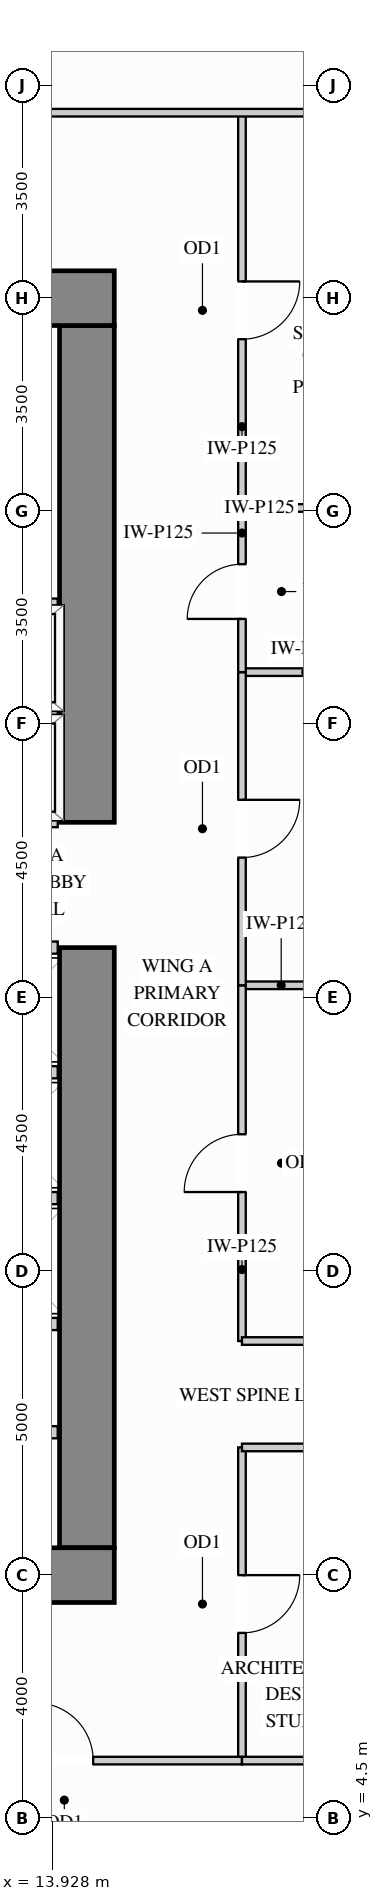
"""IFC4 building model, lengths in metres.
Left out: names, types, materials, properties, quantities, classifications, styles, units other than length and angle.
Written with IfcOpenShell. Run it as: python <this file> out.ifc"""

import sys

from ifc_helpers import new_model, si_unit, direction, frame, frame_2d, origin, place, context, subcontext, project, spatial, rectangle, extrude, source, transform, mapped, element, fill, save


model = new_model("IFC4")
c1 = context("Model", 3, precision=1e-05, world=origin(), true_north=direction((0.0, 1.0)))
c2 = subcontext(c1, "Body", "Model", "MODEL_VIEW")
j1 = project(units=[si_unit("LENGTHUNIT", "METRE"), si_unit("PLANEANGLEUNIT", "RADIAN")], contexts=[c1])
p1 = place(None, origin())
s1 = spatial("IfcSite", under=j1, at=p1, CompositionType="ELEMENT")
p2 = place(p1, origin())
s2 = spatial("IfcBuilding", under=s1, at=p2, CompositionType="ELEMENT")
p3 = place(p2, frame((0.0, 0.0, 47.7)))
s3 = spatial("IfcBuildingStorey", under=s2, at=p3, CompositionType="ELEMENT", Elevation=47.7)
m1 = source(origin(), c2, "Body", "SweptSolid", [
    extrude(rectangle(XDim=9.87, YDim=0.9, at=frame_2d((4.935, 0.0))), origin(), (0.0, 0.0, 1.0), 3.38),
])
p4 = place(p3, frame((14.5, 8.95, 0.0), z_axis=(0.0, 0.0, 1.0), x_axis=(0.0, 1.0, 0.0)))
e1 = element("IfcWall", 1, at=p4, inside=s3, PredefinedType="SHEAR", context=c2, shape_type="MappedRepresentation", body=[
    mapped(m1, transform((0.0, 0.0, 0.0), x_axis=(1.0, 0.0, 0.0), y_axis=(0.0, 1.0, 0.0), z_axis=(0.0, 0.0, 1.0))),
])
m2 = source(origin(), c2, "Body", "SweptSolid", [
    extrude(rectangle(XDim=8.17, YDim=0.9, at=frame_2d((4.085, 0.0))), origin(), (0.0, 0.0, 1.0), 3.38),
])
p5 = place(p3, frame((14.5, 20.88, 0.0), z_axis=(0.0, 0.0, 1.0), x_axis=(0.0, 1.0, 0.0)))
e2 = element("IfcWall", 2, at=p5, inside=s3, PredefinedType="SHEAR", context=c2, shape_type="MappedRepresentation", body=[
    mapped(m2, transform((0.0, 0.0, 0.0), x_axis=(1.0, 0.0, 0.0), y_axis=(0.0, 1.0, 0.0), z_axis=(0.0, 0.0, 1.0))),
])
m3 = source(origin(), c2, "Body", "SweptSolid", [
    extrude(rectangle(XDim=10.9, YDim=0.9, at=frame_2d((5.45, 0.0))), origin(), (0.0, 0.0, 1.0), 3.38),
])
for number, where, z_axis, x_axis in (
    (3, (4.05, 29.5, 0.0), (0.0, 0.0, 1.0), (1.0, 0.0, 0.0)),
    (4, (4.05, 8.5, 0.0), (0.0, 0.0, 1.0), (1.0, 0.0, 0.0)),
):
    element("IfcWall", number, at=place(p3, frame(where, z_axis=z_axis, x_axis=x_axis)), inside=s3, PredefinedType="SHEAR", context=c2, shape_type="MappedRepresentation", body=[
        mapped(m3, transform((0.0, 0.0, 0.0), x_axis=(1.0, 0.0, 0.0), y_axis=(0.0, 1.0, 0.0), z_axis=(0.0, 0.0, 1.0))),
    ])
m4 = source(origin(), c2, "Body", "SweptSolid", [
    extrude(rectangle(XDim=1.29, YDim=0.125, at=frame_2d((0.645, 0.0))), origin(), (0.0, 0.0, 1.0), 2.67),
])
p6 = place(p3, frame((17.05, 18.2, 0.0), z_axis=(0.0, 0.0, 1.0), x_axis=(1.0, 0.0, 0.0)))
e5 = element("IfcWall", 5, at=p6, inside=s3, PredefinedType="PARTITIONING", context=c2, shape_type="MappedRepresentation", body=[
    mapped(m4, transform((0.0, 0.0, 0.0), x_axis=(1.0, 0.0, 0.0), y_axis=(0.0, 1.0, 0.0), z_axis=(0.0, 0.0, 1.0))),
])
m5 = source(origin(), c2, "Body", "SweptSolid", [
    extrude(rectangle(XDim=2.098, YDim=0.125, at=frame_2d((1.049, 0.0))), origin(), (0.0, 0.0, 1.0), 3.365),
])
for number, where, z_axis, x_axis in (
    (6, (17.05, 23.35, 0.0), (0.0, 0.0, 1.0), (1.0, 0.0, 0.0)),
    (7, (17.05, 26.05, 0.0), (0.0, 0.0, 1.0), (1.0, 0.0, 0.0)),
):
    element("IfcWall", number, at=place(p3, frame(where, z_axis=z_axis, x_axis=x_axis)), inside=s3, PredefinedType="PARTITIONING", context=c2, shape_type="MappedRepresentation", body=[
        mapped(m5, transform((0.0, 0.0, 0.0), x_axis=(1.0, 0.0, 0.0), y_axis=(0.0, 1.0, 0.0), z_axis=(0.0, 0.0, 1.0))),
    ])
p7 = place(p3, frame((17.05, 12.35, 0.0), z_axis=(0.0, 0.0, 1.0), x_axis=(0.0, 1.0, 0.0)))
e8 = element("IfcWall", 8, at=p7, inside=s3, PredefinedType="PARTITIONING", context=c2, shape_type="SweptSolid", body=[
    extrude(rectangle(XDim=5.85, YDim=0.125, at=frame_2d((2.925, 0.0))), origin(), (0.0, 0.0, 1.0), 3.365),
])
p8 = place(p7, frame((2.45, 0.0, 0.0)))
e9 = element("IfcOpeningElement", 9, at=p8, cuts=e8, PredefinedType="OPENING", context=c2, shape_type="SweptSolid", body=[
    extrude(rectangle(XDim=0.95, YDim=2.15, at=frame_2d((0.475, 1.075))), frame((0.0, 0.073, 0.0), z_axis=(0.0, -1.0, 0.0), x_axis=(1.0, 0.0, 0.0)), (0.0, 0.0, 1.0), 0.145),
])
p9 = place(p3, frame((17.05, 18.2, 0.0), z_axis=(0.0, 0.0, 1.0), x_axis=(0.0, 1.0, 0.0)))
e10 = element("IfcWall", 10, at=p9, inside=s3, PredefinedType="PARTITIONING", context=c2, shape_type="SweptSolid", body=[
    extrude(rectangle(XDim=5.15, YDim=0.125, at=frame_2d((2.575, 0.0))), origin(), (0.0, 0.0, 1.0), 3.365),
])
p10 = place(p9, frame((2.1, 0.0, 0.0)))
e11 = element("IfcOpeningElement", 11, at=p10, cuts=e10, PredefinedType="OPENING", context=c2, shape_type="SweptSolid", body=[
    extrude(rectangle(XDim=0.95, YDim=2.15, at=frame_2d((0.475, 1.075))), frame((0.0, 0.073, 0.0), z_axis=(0.0, -1.0, 0.0), x_axis=(1.0, 0.0, 0.0)), (0.0, 0.0, 1.0), 0.145),
])
p11 = place(p3, frame((17.05, 26.05, 0.0), z_axis=(0.0, 0.0, 1.0), x_axis=(0.0, 1.0, 0.0)))
e12 = element("IfcWall", 12, at=p11, inside=s3, PredefinedType="PARTITIONING", context=c2, shape_type="SweptSolid", body=[
    extrude(rectangle(XDim=6.5, YDim=0.125, at=frame_2d((3.25, 0.0))), origin(), (0.0, 0.0, 1.0), 3.365),
])
p12 = place(p11, frame((2.775, 0.0, 0.0)))
e13 = element("IfcOpeningElement", 13, at=p12, cuts=e12, PredefinedType="OPENING", context=c2, shape_type="SweptSolid", body=[
    extrude(rectangle(XDim=0.95, YDim=2.15, at=frame_2d((0.475, 1.075))), frame((0.0, 0.073, 0.0), z_axis=(0.0, -1.0, 0.0), x_axis=(1.0, 0.0, 0.0)), (0.0, 0.0, 1.0), 0.145),
])
p13 = place(p3, frame((17.05, 5.45, 0.0), z_axis=(0.0, 0.0, 1.0), x_axis=(0.0, 1.0, 0.0)))
e14 = element("IfcWall", 14, at=p13, inside=s3, PredefinedType="PARTITIONING", context=c2, shape_type="SweptSolid", body=[
    extrude(rectangle(XDim=5.15, YDim=0.125, at=frame_2d((2.575, 0.0))), origin(), (0.0, 0.0, 1.0), 3.365),
])
p14 = place(p13, frame((2.1, 0.0, 0.0)))
e15 = element("IfcOpeningElement", 15, at=p14, cuts=e14, PredefinedType="OPENING", context=c2, shape_type="SweptSolid", body=[
    extrude(rectangle(XDim=0.95, YDim=2.15, at=frame_2d((0.475, 1.075))), frame((0.0, 0.073, 0.0), z_axis=(0.0, -1.0, 0.0), x_axis=(1.0, 0.0, 0.0)), (0.0, 0.0, 1.0), 0.145),
])
p15 = place(p3, frame((17.05, 23.35, 0.0), z_axis=(0.0, 0.0, 1.0), x_axis=(0.0, 1.0, 0.0)))
e16 = element("IfcWall", 16, at=p15, inside=s3, PredefinedType="PARTITIONING", context=c2, shape_type="SweptSolid", body=[
    extrude(rectangle(XDim=2.7, YDim=0.125, at=frame_2d((1.35, 0.0))), origin(), (0.0, 0.0, 1.0), 3.365),
])
p16 = place(p15, frame((0.875, 0.0, 0.0)))
e17 = element("IfcOpeningElement", 17, at=p16, cuts=e16, PredefinedType="OPENING", context=c2, shape_type="SweptSolid", body=[
    extrude(rectangle(XDim=0.9, YDim=2.15, at=frame_2d((0.45, 1.075))), frame((0.0, 0.073, 0.0), z_axis=(0.0, -1.0, 0.0), x_axis=(1.0, 0.0, 0.0)), (0.0, 0.0, 1.0), 0.145),
])
m6 = source(origin(), c2, "Body", "SweptSolid", [
    extrude(rectangle(XDim=5.798, YDim=0.125, at=frame_2d((2.899, 0.0))), origin(), (0.0, 0.0, 1.0), 3.365),
])
p17 = place(p3, frame((13.35, 32.55, 0.0), z_axis=(0.0, 0.0, 1.0), x_axis=(1.0, 0.0, 0.0)))
e18 = element("IfcWall", 18, at=p17, inside=s3, PredefinedType="PARTITIONING", context=c2, shape_type="MappedRepresentation", body=[
    mapped(m6, transform((0.0, 0.0, 0.0), x_axis=(1.0, 0.0, 0.0), y_axis=(0.0, 1.0, 0.0), z_axis=(0.0, 0.0, 1.0))),
])
m7 = source(origin(), c2, "Body", "SweptSolid", [
    extrude(rectangle(XDim=2.45, YDim=0.125, at=frame_2d((1.225, 0.0))), origin(), (0.0, 0.0, 1.0), 3.365),
])
for number, where, z_axis, x_axis in (
    (19, (17.05, 12.35, 0.0), (0.0, 0.0, 1.0), (1.0, 0.0, 0.0)),
    (20, (17.05, 10.6, 0.0), (0.0, 0.0, 1.0), (1.0, 0.0, 0.0)),
):
    element("IfcWall", number, at=place(p3, frame(where, z_axis=z_axis, x_axis=x_axis)), inside=s3, PredefinedType="PARTITIONING", context=c2, shape_type="MappedRepresentation", body=[
        mapped(m7, transform((0.0, 0.0, 0.0), x_axis=(1.0, 0.0, 0.0), y_axis=(0.0, 1.0, 0.0), z_axis=(0.0, 0.0, 1.0))),
    ])
p18 = place(p3, frame((11.206, 5.45, 0.0), z_axis=(0.0, 0.0, 1.0), x_axis=(1.0, 0.0, 0.0)))
e21 = element("IfcWall", 21, at=p18, inside=s3, PredefinedType="PARTITIONING", context=c2, shape_type="SweptSolid", body=[
    extrude(rectangle(XDim=5.844, YDim=0.125, at=frame_2d((2.922, 0.0))), origin(), (0.0, 0.0, 1.0), 3.365),
])
p19 = place(p18, frame((2.447, 0.0, 0.0)))
e22 = element("IfcOpeningElement", 22, at=p19, cuts=e21, PredefinedType="OPENING", context=c2, shape_type="SweptSolid", body=[
    extrude(rectangle(XDim=0.95, YDim=2.15, at=frame_2d((0.475, 1.075))), frame((0.0, 0.073, 0.0), z_axis=(0.0, -1.0, 0.0), x_axis=(1.0, 0.0, 0.0)), (0.0, 0.0, 1.0), 0.145),
])
p20 = place(p3, frame((17.05, 5.45, 0.0), z_axis=(0.0, 0.0, 1.0), x_axis=(1.0, 0.0, 0.0)))
e23 = element("IfcWall", 23, at=p20, inside=s3, PredefinedType="PARTITIONING", context=c2, shape_type="MappedRepresentation", body=[
    mapped(m5, transform((0.0, 0.0, 0.0), x_axis=(1.0, 0.0, 0.0), y_axis=(0.0, 1.0, 0.0), z_axis=(0.0, 0.0, 1.0))),
])
m8 = source(origin(), c2, "Body", "SweptSolid", [
    extrude(rectangle(XDim=1.6, YDim=0.2, at=frame_2d((0.8, 0.0))), origin(), (0.0, 0.0, 1.0), 3.365),
])
p21 = place(p3, frame((12.42, 10.85, 0.0), z_axis=(0.0, 0.0, 1.0), x_axis=(1.0, 0.0, 0.0)))
e24 = element("IfcWall", 24, at=p21, inside=s3, PredefinedType="PARTITIONING", context=c2, shape_type="MappedRepresentation", body=[
    mapped(m8, transform((0.0, 0.0, 0.0), x_axis=(1.0, 0.0, 0.0), y_axis=(0.0, 1.0, 0.0), z_axis=(0.0, 0.0, 1.0))),
])
m9 = source(origin(), c2, "Body", "SweptSolid", [
    extrude(rectangle(XDim=2.19, YDim=0.2, at=frame_2d((1.095, 0.0))), origin(), (0.0, 0.0, 1.0), 3.365),
])
for number, where, z_axis, x_axis in (
    (25, (11.83, 22.66, 0.0), (0.0, 0.0, 1.0), (1.0, 0.0, 0.0)),
    (26, (11.83, 20.9, 0.0), (0.0, 0.0, 1.0), (1.0, 0.0, 0.0)),
    (27, (11.83, 24.46, 0.0), (0.0, 0.0, 1.0), (1.0, 0.0, 0.0)),
):
    element("IfcWall", number, at=place(p3, frame(where, z_axis=z_axis, x_axis=x_axis)), inside=s3, PredefinedType="PARTITIONING", context=c2, shape_type="MappedRepresentation", body=[
        mapped(m9, transform((0.0, 0.0, 0.0), x_axis=(1.0, 0.0, 0.0), y_axis=(0.0, 1.0, 0.0), z_axis=(0.0, 0.0, 1.0))),
    ])
m10 = source(origin(), c2, "Body", "SweptSolid", [
    extrude(rectangle(XDim=1.79, YDim=0.2, at=frame_2d((0.895, 0.0))), origin(), (0.0, 0.0, 1.0), 3.365),
])
for number, where, z_axis, x_axis in (
    (28, (12.23, 14.7, 0.0), (0.0, 0.0, 1.0), (1.0, 0.0, 0.0)),
    (29, (12.23, 12.63, 0.0), (0.0, 0.0, 1.0), (1.0, 0.0, 0.0)),
    (30, (12.23, 16.77, 0.0), (0.0, 0.0, 1.0), (1.0, 0.0, 0.0)),
    (31, (12.23, 18.82, 0.0), (0.0, 0.0, 1.0), (1.0, 0.0, 0.0)),
):
    element("IfcWall", number, at=place(p3, frame(where, z_axis=z_axis, x_axis=x_axis)), inside=s3, PredefinedType="PARTITIONING", context=c2, shape_type="MappedRepresentation", body=[
        mapped(m10, transform((0.0, 0.0, 0.0), x_axis=(1.0, 0.0, 0.0), y_axis=(0.0, 1.0, 0.0), z_axis=(0.0, 0.0, 1.0))),
    ])
m11 = source(origin(), c2, "Body", "SweptSolid", [
    extrude(rectangle(XDim=0.95, YDim=2.15, at=frame_2d((0.475, 1.075))), frame((0.0, 0.025, 0.0), z_axis=(0.0, -1.0, 0.0), x_axis=(1.0, 0.0, 0.0)), (0.0, 0.0, 1.0), 0.05),
])
p22 = place(p14, origin())
e32 = element("IfcDoor", 32, at=p22, inside=s3, OperationType="SINGLE_SWING_RIGHT", PredefinedType="DOOR", context=c2, shape_type="MappedRepresentation", body=[
    mapped(m11, transform((0.0, 0.0, 0.0), x_axis=(1.0, 0.0, 0.0), y_axis=(0.0, 1.0, 0.0), z_axis=(0.0, 0.0, 1.0))),
])
fill(e15, e32)
p23 = place(p8, origin())
e33 = element("IfcDoor", 33, at=p23, inside=s3, OperationType="SINGLE_SWING_LEFT", PredefinedType="DOOR", context=c2, shape_type="MappedRepresentation", body=[
    mapped(m11, transform((0.0, 0.0, 0.0), x_axis=(1.0, 0.0, 0.0), y_axis=(0.0, 1.0, 0.0), z_axis=(0.0, 0.0, 1.0))),
])
fill(e9, e33)
p24 = place(p10, origin())
e34 = element("IfcDoor", 34, at=p24, inside=s3, OperationType="SINGLE_SWING_RIGHT", PredefinedType="DOOR", context=c2, shape_type="MappedRepresentation", body=[
    mapped(m11, transform((0.0, 0.0, 0.0), x_axis=(1.0, 0.0, 0.0), y_axis=(0.0, 1.0, 0.0), z_axis=(0.0, 0.0, 1.0))),
])
fill(e11, e34)
p25 = place(p12, origin())
e35 = element("IfcDoor", 35, at=p25, inside=s3, OperationType="SINGLE_SWING_RIGHT", PredefinedType="DOOR", context=c2, shape_type="MappedRepresentation", body=[
    mapped(m11, transform((0.0, 0.0, 0.0), x_axis=(1.0, 0.0, 0.0), y_axis=(0.0, 1.0, 0.0), z_axis=(0.0, 0.0, 1.0))),
])
fill(e13, e35)
p26 = place(p19, origin())
e36 = element("IfcDoor", 36, at=p26, inside=s3, OperationType="SINGLE_SWING_LEFT", PredefinedType="DOOR", context=c2, shape_type="MappedRepresentation", body=[
    mapped(m11, transform((0.0, 0.0, 0.0), x_axis=(1.0, 0.0, 0.0), y_axis=(0.0, 1.0, 0.0), z_axis=(0.0, 0.0, 1.0))),
])
fill(e22, e36)
m12 = source(origin(), c2, "Body", "SweptSolid", [
    extrude(rectangle(XDim=0.9, YDim=2.15, at=frame_2d((0.45, 1.075))), frame((0.0, 0.025, 0.0), z_axis=(0.0, -1.0, 0.0), x_axis=(1.0, 0.0, 0.0)), (0.0, 0.0, 1.0), 0.05),
])
p27 = place(p16, origin())
e37 = element("IfcDoor", 37, at=p27, inside=s3, OperationType="SINGLE_SWING_LEFT", PredefinedType="DOOR", context=c2, shape_type="MappedRepresentation", body=[
    mapped(m12, transform((0.0, 0.0, 0.0), x_axis=(1.0, 0.0, 0.0), y_axis=(0.0, 1.0, 0.0), z_axis=(0.0, 0.0, 1.0))),
])
fill(e17, e37)
save(model, sys.argv[1])
